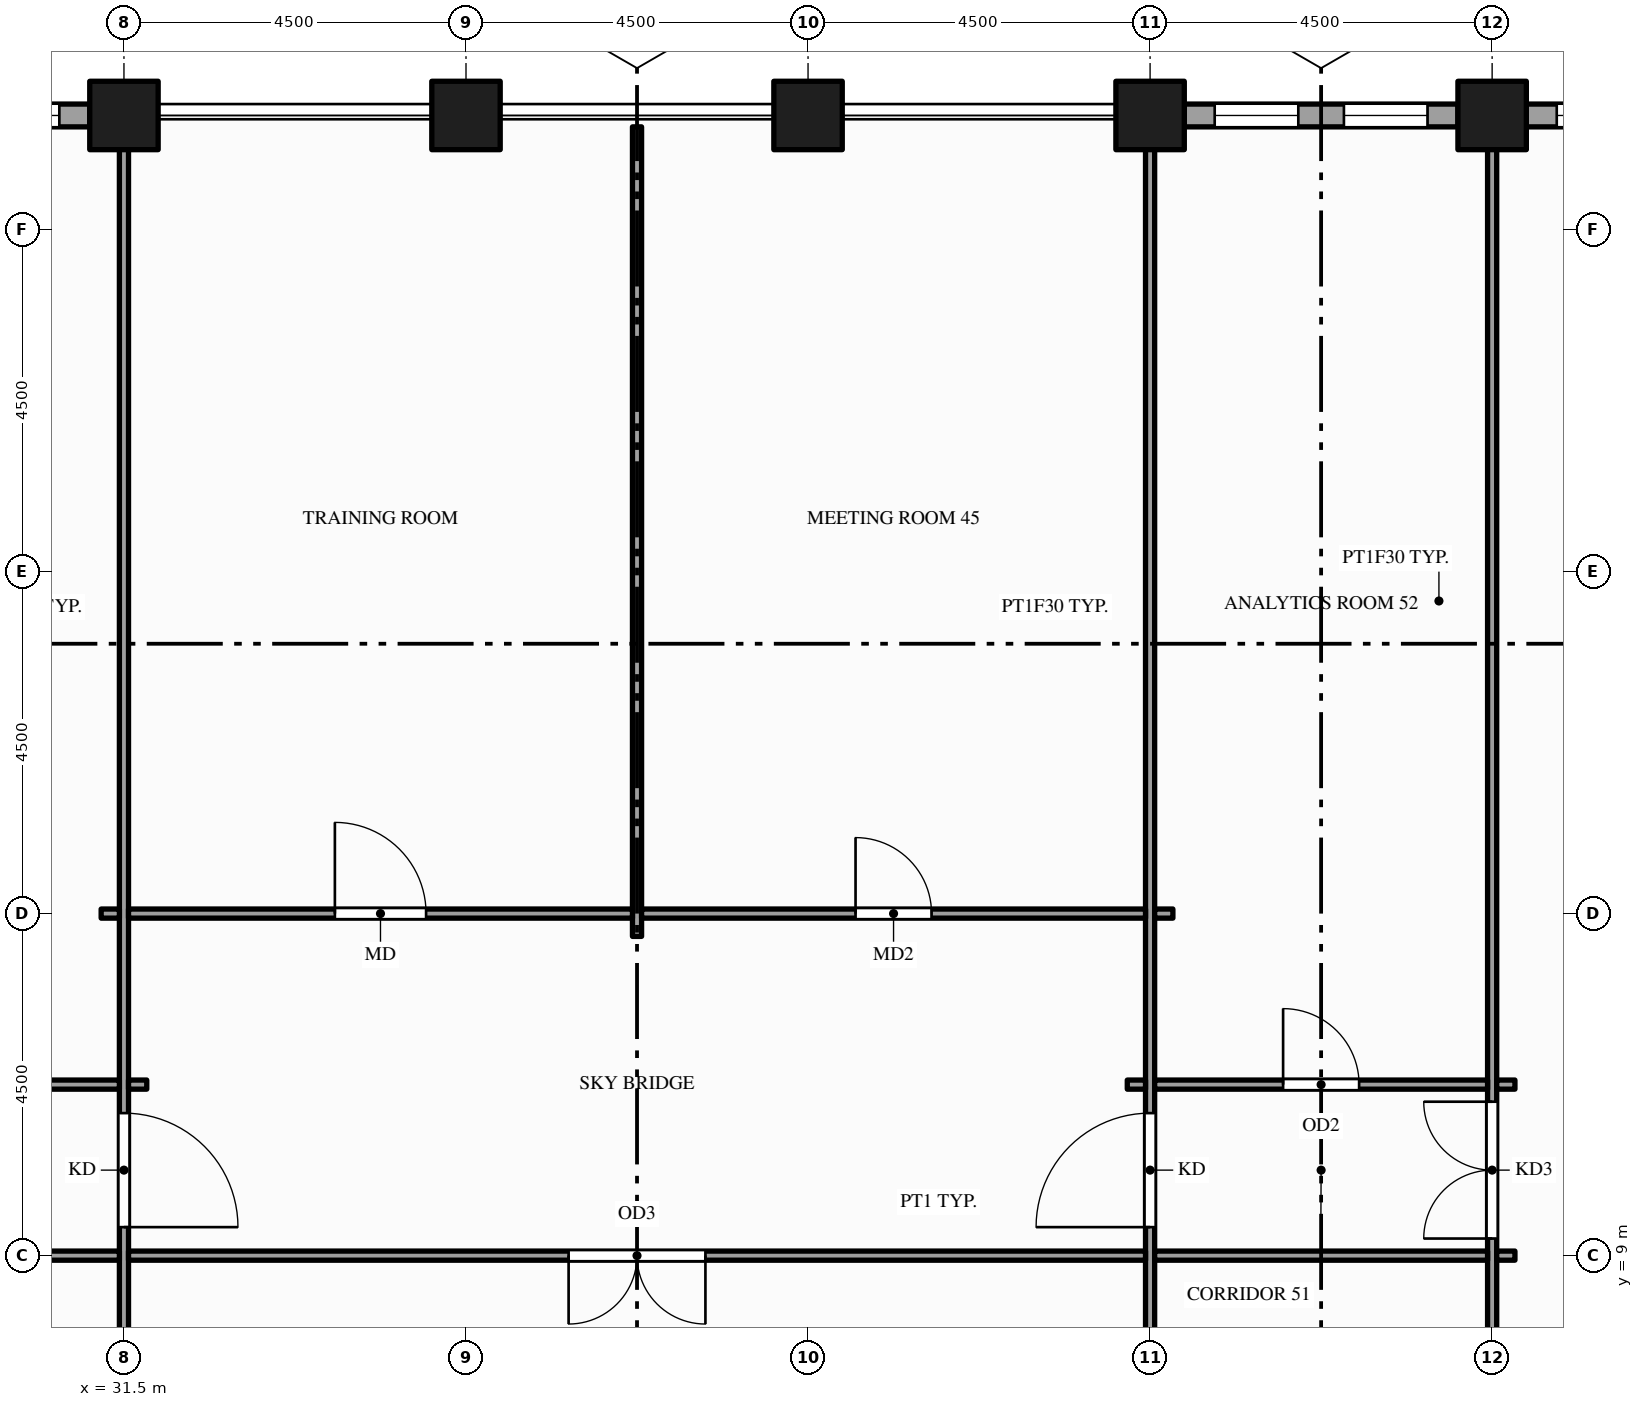
"""IFC4 building model, lengths in metres.
Left out: names, types, materials, properties, quantities, classifications, styles, units other than length and angle.
Written with IfcOpenShell. Run it as: python <this file> out.ifc"""

import sys

from ifc_helpers import new_model, si_unit, direction, frame, frame_2d, origin, origin_2d, place, context, subcontext, project, spatial, rectangle, hollow_rectangle, extrude, element, fill, save


model = new_model("IFC4")
c1 = context("Model", 3, precision=1e-05, world=origin(), true_north=direction((0.0, 1.0)))
c2 = subcontext(c1, "Body", "Model", "MODEL_VIEW")
j1 = project(units=[si_unit("LENGTHUNIT", "METRE"), si_unit("PLANEANGLEUNIT", "RADIAN")], contexts=[c1])
p1 = place(None, origin())
s1 = spatial("IfcSite", under=j1, at=p1, CompositionType="ELEMENT")
p2 = place(p1, origin())
s2 = spatial("IfcBuilding", under=s1, at=p2, CompositionType="ELEMENT")
p3 = place(p2, frame((0.0, 0.0, 151.0)))
s3 = spatial("IfcBuildingStorey", under=s2, at=p3, CompositionType="ELEMENT", Elevation=151.0)
for number, where, z_axis, x_axis in (
    (1, (31.5, 24.0, -0.15), (0.0, 0.0, 1.0), (1.0, 0.0, 0.0)),
    (2, (36.0, 24.0, -0.15), (0.0, 0.0, 1.0), (1.0, 0.0, 0.0)),
    (3, (40.5, 24.0, -0.15), (0.0, 0.0, 1.0), (1.0, 0.0, 0.0)),
    (4, (45.0, 24.0, -0.15), (0.0, 0.0, 1.0), (1.0, 0.0, 0.0)),
    (5, (49.5, 24.0, -0.15), (0.0, 0.0, 1.0), (1.0, 0.0, 0.0)),
):
    element("IfcColumn", number, at=place(p3, frame(where, z_axis=z_axis, x_axis=x_axis)), inside=s3, PredefinedType="COLUMN", context=c2, shape_type="SweptSolid", body=[
        extrude(hollow_rectangle(XDim=0.9, YDim=0.9, WallThickness=0.045, at=origin_2d()), origin(), (0.0, 0.0, 1.0), 4.0),
    ])
p4 = place(p3, frame((53.55, 24.0, 0.0), z_axis=(0.0, 0.0, 1.0), x_axis=(-1.0, 0.0, 0.0)))
e6 = element("IfcWall", 6, at=p4, inside=s3, PredefinedType="STANDARD", context=c2, shape_type="SweptSolid", body=[
    extrude(rectangle(XDim=3.6, YDim=0.3, at=frame_2d((1.8, 0.0))), origin(), (0.0, 0.0, 1.0), 2.87),
])
p5 = place(p4, frame((0.4, 0.0, 0.9)))
e7 = element("IfcOpeningElement", 7, at=p5, cuts=e6, PredefinedType="OPENING", context=c2, shape_type="SweptSolid", body=[
    extrude(rectangle(XDim=1.1, YDim=1.75, at=frame_2d((0.55, 0.875))), frame((0.0, 0.16, 0.0), z_axis=(0.0, -1.0, 0.0), x_axis=(1.0, 0.0, 0.0)), (0.0, 0.0, 1.0), 0.32),
])
p6 = place(p4, frame((2.1, 0.0, 0.9)))
e8 = element("IfcOpeningElement", 8, at=p6, cuts=e6, PredefinedType="OPENING", context=c2, shape_type="SweptSolid", body=[
    extrude(rectangle(XDim=1.1, YDim=1.75, at=frame_2d((0.55, 0.875))), frame((0.0, 0.16, 0.0), z_axis=(0.0, -1.0, 0.0), x_axis=(1.0, 0.0, 0.0)), (0.0, 0.0, 1.0), 0.32),
])
p7 = place(p3, frame((49.05, 24.0, 0.0), z_axis=(0.0, 0.0, 1.0), x_axis=(-1.0, 0.0, 0.0)))
e9 = element("IfcWall", 9, at=p7, inside=s3, PredefinedType="STANDARD", context=c2, shape_type="SweptSolid", body=[
    extrude(rectangle(XDim=3.6, YDim=0.3, at=frame_2d((1.8, 0.0))), origin(), (0.0, 0.0, 1.0), 2.87),
])
p8 = place(p7, frame((0.4, 0.0, 0.9)))
e10 = element("IfcOpeningElement", 10, at=p8, cuts=e9, PredefinedType="OPENING", context=c2, shape_type="SweptSolid", body=[
    extrude(rectangle(XDim=1.1, YDim=1.75, at=frame_2d((0.55, 0.875))), frame((0.0, 0.16, 0.0), z_axis=(0.0, -1.0, 0.0), x_axis=(1.0, 0.0, 0.0)), (0.0, 0.0, 1.0), 0.32),
])
p9 = place(p7, frame((2.1, 0.0, 0.9)))
e11 = element("IfcOpeningElement", 11, at=p9, cuts=e9, PredefinedType="OPENING", context=c2, shape_type="SweptSolid", body=[
    extrude(rectangle(XDim=1.1, YDim=1.75, at=frame_2d((0.55, 0.875))), frame((0.0, 0.16, 0.0), z_axis=(0.0, -1.0, 0.0), x_axis=(1.0, 0.0, 0.0)), (0.0, 0.0, 1.0), 0.32),
])
p10 = place(p3, frame((31.05, 24.0, 0.0), z_axis=(0.0, 0.0, 1.0), x_axis=(-1.0, 0.0, 0.0)))
e12 = element("IfcWall", 12, at=p10, inside=s3, PredefinedType="STANDARD", context=c2, shape_type="SweptSolid", body=[
    extrude(rectangle(XDim=5.1, YDim=0.3, at=frame_2d((2.55, 0.0))), origin(), (0.0, 0.0, 1.0), 2.87),
])
p11 = place(p10, frame((0.4, 0.0, 0.9)))
e13 = element("IfcOpeningElement", 13, at=p11, cuts=e12, PredefinedType="OPENING", context=c2, shape_type="SweptSolid", body=[
    extrude(rectangle(XDim=1.1, YDim=1.75, at=frame_2d((0.55, 0.875))), frame((0.0, 0.16, 0.0), z_axis=(0.0, -1.0, 0.0), x_axis=(1.0, 0.0, 0.0)), (0.0, 0.0, 1.0), 0.32),
])
p12 = place(p10, frame((2.1, 0.0, 0.9)))
e14 = element("IfcOpeningElement", 14, at=p12, cuts=e12, PredefinedType="OPENING", context=c2, shape_type="SweptSolid", body=[
    extrude(rectangle(XDim=1.65, YDim=1.75, at=frame_2d((0.825, 0.875))), frame((0.0, 0.16, 0.0), z_axis=(0.0, -1.0, 0.0), x_axis=(1.0, 0.0, 0.0)), (0.0, 0.0, 1.0), 0.32),
])
p13 = place(p3, frame((31.5, 1.65, 0.0), z_axis=(0.0, 0.0, 1.0), x_axis=(0.0, 1.0, 0.0)))
e15 = element("IfcWall", 15, at=p13, inside=s3, PredefinedType="PARTITIONING", context=c2, shape_type="SweptSolid", body=[
    extrude(rectangle(XDim=22.2, YDim=0.12, at=frame_2d((11.1, 0.0))), origin(), (0.0, 0.0, 1.0), 2.87),
])
p14 = place(p13, frame((7.725, 0.0, 0.0)))
e16 = element("IfcOpeningElement", 16, at=p14, cuts=e15, PredefinedType="OPENING", context=c2, shape_type="SweptSolid", body=[
    extrude(rectangle(XDim=1.5, YDim=2.1, at=frame_2d((0.75, 1.05))), frame((0.0, 0.07, 0.0), z_axis=(0.0, -1.0, 0.0), x_axis=(1.0, 0.0, 0.0)), (0.0, 0.0, 1.0), 0.14),
])
p15 = place(p3, frame((38.25, 13.2, 0.0), z_axis=(0.0, 0.0, 1.0), x_axis=(0.0, 1.0, 0.0)))
e17 = element("IfcWall", 17, at=p15, inside=s3, PredefinedType="PARTITIONING", context=c2, shape_type="SweptSolid", body=[
    extrude(rectangle(XDim=10.65, YDim=0.12, at=frame_2d((5.325, 0.0))), origin(), (0.0, 0.0, 1.0), 2.87),
])
p16 = place(p3, frame((45.0, 1.65, 0.0), z_axis=(0.0, 0.0, 1.0), x_axis=(0.0, 1.0, 0.0)))
e18 = element("IfcWall", 18, at=p16, inside=s3, PredefinedType="PARTITIONING", context=c2, shape_type="SweptSolid", body=[
    extrude(rectangle(XDim=22.2, YDim=0.12, at=frame_2d((11.1, 0.0))), origin(), (0.0, 0.0, 1.0), 2.87),
])
p17 = place(p16, frame((7.725, 0.0, 0.0)))
e19 = element("IfcOpeningElement", 19, at=p17, cuts=e18, PredefinedType="OPENING", context=c2, shape_type="SweptSolid", body=[
    extrude(rectangle(XDim=1.5, YDim=2.1, at=frame_2d((0.75, 1.05))), frame((0.0, 0.07, 0.0), z_axis=(0.0, -1.0, 0.0), x_axis=(1.0, 0.0, 0.0)), (0.0, 0.0, 1.0), 0.14),
])
p18 = place(p3, frame((49.5, 1.65, 0.0), z_axis=(0.0, 0.0, 1.0), x_axis=(0.0, 1.0, 0.0)))
e20 = element("IfcWall", 20, at=p18, inside=s3, PredefinedType="PARTITIONING", context=c2, shape_type="SweptSolid", body=[
    extrude(rectangle(XDim=22.2, YDim=0.12, at=frame_2d((11.1, 0.0))), origin(), (0.0, 0.0, 1.0), 2.87),
])
p19 = place(p18, frame((7.575, 0.0, 0.0)))
e21 = element("IfcOpeningElement", 21, at=p19, cuts=e20, PredefinedType="OPENING", context=c2, shape_type="SweptSolid", body=[
    extrude(rectangle(XDim=1.8, YDim=2.1, at=frame_2d((0.9, 1.05))), frame((0.0, 0.07, 0.0), z_axis=(0.0, -1.0, 0.0), x_axis=(1.0, 0.0, 0.0)), (0.0, 0.0, 1.0), 0.14),
])
p20 = place(p18, frame((0.85, 0.0, 0.0)))
e22 = element("IfcOpeningElement", 22, at=p20, cuts=e20, PredefinedType="OPENING", context=c2, shape_type="SweptSolid", body=[
    extrude(rectangle(XDim=0.9, YDim=2.1, at=frame_2d((0.45, 1.05))), frame((0.0, 0.07, 0.0), z_axis=(0.0, -1.0, 0.0), x_axis=(1.0, 0.0, 0.0)), (0.0, 0.0, 1.0), 0.14),
])
p21 = place(p18, frame((3.15, 0.0, 0.0)))
e23 = element("IfcOpeningElement", 23, at=p21, cuts=e20, PredefinedType="OPENING", context=c2, shape_type="SweptSolid", body=[
    extrude(rectangle(XDim=0.9, YDim=2.1, at=frame_2d((0.45, 1.05))), frame((0.0, 0.07, 0.0), z_axis=(0.0, -1.0, 0.0), x_axis=(1.0, 0.0, 0.0)), (0.0, 0.0, 1.0), 0.14),
])
p22 = place(p18, frame((5.35, 0.0, 0.0)))
e24 = element("IfcOpeningElement", 24, at=p22, cuts=e20, PredefinedType="OPENING", context=c2, shape_type="SweptSolid", body=[
    extrude(rectangle(XDim=1.0, YDim=2.1, at=frame_2d((0.5, 1.05))), frame((0.0, 0.07, 0.0), z_axis=(0.0, -1.0, 0.0), x_axis=(1.0, 0.0, 0.0)), (0.0, 0.0, 1.0), 0.14),
])
p23 = place(p3, frame((24.81, 9.0, 0.0), z_axis=(0.0, 0.0, 1.0), x_axis=(1.0, 0.0, 0.0)))
e25 = element("IfcWall", 25, at=p23, inside=s3, PredefinedType="PARTITIONING", context=c2, shape_type="SweptSolid", body=[
    extrude(rectangle(XDim=6.63, YDim=0.12, at=frame_2d((3.315, 0.0))), origin(), (0.0, 0.0, 1.0), 2.87),
])
p24 = place(p23, frame((2.815, 0.0, 0.0)))
e26 = element("IfcOpeningElement", 26, at=p24, cuts=e25, PredefinedType="OPENING", context=c2, shape_type="SweptSolid", body=[
    extrude(rectangle(XDim=1.0, YDim=2.1, at=frame_2d((0.5, 1.05))), frame((0.0, 0.07, 0.0), z_axis=(0.0, -1.0, 0.0), x_axis=(1.0, 0.0, 0.0)), (0.0, 0.0, 1.0), 0.14),
])
p25 = place(p3, frame((31.56, 9.0, 0.0), z_axis=(0.0, 0.0, 1.0), x_axis=(1.0, 0.0, 0.0)))
e27 = element("IfcWall", 27, at=p25, inside=s3, PredefinedType="PARTITIONING", context=c2, shape_type="SweptSolid", body=[
    extrude(rectangle(XDim=13.38, YDim=0.12, at=frame_2d((6.69, 0.0))), origin(), (0.0, 0.0, 1.0), 2.87),
])
p26 = place(p25, frame((5.79, 0.0, 0.0)))
e28 = element("IfcOpeningElement", 28, at=p26, cuts=e27, PredefinedType="OPENING", context=c2, shape_type="SweptSolid", body=[
    extrude(rectangle(XDim=1.8, YDim=2.1, at=frame_2d((0.9, 1.05))), frame((0.0, 0.07, 0.0), z_axis=(0.0, -1.0, 0.0), x_axis=(1.0, 0.0, 0.0)), (0.0, 0.0, 1.0), 0.14),
])
p27 = place(p3, frame((45.06, 9.0, 0.0), z_axis=(0.0, 0.0, 1.0), x_axis=(1.0, 0.0, 0.0)))
e29 = element("IfcWall", 29, at=p27, inside=s3, PredefinedType="PARTITIONING", context=c2, shape_type="SweptSolid", body=[
    extrude(rectangle(XDim=4.38, YDim=0.12, at=frame_2d((2.19, 0.0))), origin(), (0.0, 0.0, 1.0), 2.87),
])
p28 = place(p3, frame((49.56, 9.0, 0.0), z_axis=(0.0, 0.0, 1.0), x_axis=(1.0, 0.0, 0.0)))
e30 = element("IfcWall", 30, at=p28, inside=s3, PredefinedType="PARTITIONING", context=c2, shape_type="SweptSolid", body=[
    extrude(rectangle(XDim=0.24, YDim=0.12, at=frame_2d((0.12, 0.0))), origin(), (0.0, 0.0, 1.0), 2.87),
])
p29 = place(p3, frame((13.56, 11.25, 0.0), z_axis=(0.0, 0.0, 1.0), x_axis=(1.0, 0.0, 0.0)))
e31 = element("IfcWall", 31, at=p29, inside=s3, PredefinedType="PARTITIONING", context=c2, shape_type="SweptSolid", body=[
    extrude(rectangle(XDim=17.88, YDim=0.12, at=frame_2d((8.94, 0.0))), origin(), (0.0, 0.0, 1.0), 2.87),
])
p30 = place(p29, frame((8.04, 0.0, 0.0)))
e32 = element("IfcOpeningElement", 32, at=p30, cuts=e31, PredefinedType="OPENING", context=c2, shape_type="SweptSolid", body=[
    extrude(rectangle(XDim=1.8, YDim=2.1, at=frame_2d((0.9, 1.05))), frame((0.0, 0.07, 0.0), z_axis=(0.0, -1.0, 0.0), x_axis=(1.0, 0.0, 0.0)), (0.0, 0.0, 1.0), 0.14),
])
for number, where, z_axis, x_axis in (
    (33, (31.56, 11.25, 0.0), (0.0, 0.0, 1.0), (1.0, 0.0, 0.0)),
    (34, (44.7, 11.25, 0.0), (0.0, 0.0, 1.0), (1.0, 0.0, 0.0)),
):
    element("IfcWall", number, at=place(p3, frame(where, z_axis=z_axis, x_axis=x_axis)), inside=s3, PredefinedType="PARTITIONING", context=c2, shape_type="SweptSolid", body=[
        extrude(rectangle(XDim=0.24, YDim=0.12, at=frame_2d((0.12, 0.0))), origin(), (0.0, 0.0, 1.0), 2.87),
    ])
p31 = place(p3, frame((45.06, 11.25, 0.0), z_axis=(0.0, 0.0, 1.0), x_axis=(1.0, 0.0, 0.0)))
e35 = element("IfcWall", 35, at=p31, inside=s3, PredefinedType="PARTITIONING", context=c2, shape_type="SweptSolid", body=[
    extrude(rectangle(XDim=4.38, YDim=0.12, at=frame_2d((2.19, 0.0))), origin(), (0.0, 0.0, 1.0), 2.87),
])
p32 = place(p31, frame((1.69, 0.0, 0.0)))
e36 = element("IfcOpeningElement", 36, at=p32, cuts=e35, PredefinedType="OPENING", context=c2, shape_type="SweptSolid", body=[
    extrude(rectangle(XDim=1.0, YDim=2.1, at=frame_2d((0.5, 1.05))), frame((0.0, 0.07, 0.0), z_axis=(0.0, -1.0, 0.0), x_axis=(1.0, 0.0, 0.0)), (0.0, 0.0, 1.0), 0.14),
])
for number, where, z_axis, x_axis in (
    (37, (49.56, 11.25, 0.0), (0.0, 0.0, 1.0), (1.0, 0.0, 0.0)),
    (38, (31.2, 13.5, 0.0), (0.0, 0.0, 1.0), (1.0, 0.0, 0.0)),
):
    element("IfcWall", number, at=place(p3, frame(where, z_axis=z_axis, x_axis=x_axis)), inside=s3, PredefinedType="PARTITIONING", context=c2, shape_type="SweptSolid", body=[
        extrude(rectangle(XDim=0.24, YDim=0.12, at=frame_2d((0.12, 0.0))), origin(), (0.0, 0.0, 1.0), 2.87),
    ])
p33 = place(p3, frame((31.56, 13.5, 0.0), z_axis=(0.0, 0.0, 1.0), x_axis=(1.0, 0.0, 0.0)))
e39 = element("IfcWall", 39, at=p33, inside=s3, PredefinedType="PARTITIONING", context=c2, shape_type="SweptSolid", body=[
    extrude(rectangle(XDim=6.63, YDim=0.12, at=frame_2d((3.315, 0.0))), origin(), (0.0, 0.0, 1.0), 2.87),
])
p34 = place(p33, frame((2.715, 0.0, 0.0)))
e40 = element("IfcOpeningElement", 40, at=p34, cuts=e39, PredefinedType="OPENING", context=c2, shape_type="SweptSolid", body=[
    extrude(rectangle(XDim=1.2, YDim=2.1, at=frame_2d((0.6, 1.05))), frame((0.0, 0.07, 0.0), z_axis=(0.0, -1.0, 0.0), x_axis=(1.0, 0.0, 0.0)), (0.0, 0.0, 1.0), 0.14),
])
p35 = place(p3, frame((38.31, 13.5, 0.0), z_axis=(0.0, 0.0, 1.0), x_axis=(1.0, 0.0, 0.0)))
e41 = element("IfcWall", 41, at=p35, inside=s3, PredefinedType="PARTITIONING", context=c2, shape_type="SweptSolid", body=[
    extrude(rectangle(XDim=6.63, YDim=0.12, at=frame_2d((3.315, 0.0))), origin(), (0.0, 0.0, 1.0), 2.87),
])
p36 = place(p35, frame((2.815, 0.0, 0.0)))
e42 = element("IfcOpeningElement", 42, at=p36, cuts=e41, PredefinedType="OPENING", context=c2, shape_type="SweptSolid", body=[
    extrude(rectangle(XDim=1.0, YDim=2.1, at=frame_2d((0.5, 1.05))), frame((0.0, 0.07, 0.0), z_axis=(0.0, -1.0, 0.0), x_axis=(1.0, 0.0, 0.0)), (0.0, 0.0, 1.0), 0.14),
])
p37 = place(p3, frame((45.06, 13.5, 0.0), z_axis=(0.0, 0.0, 1.0), x_axis=(1.0, 0.0, 0.0)))
e43 = element("IfcWall", 43, at=p37, inside=s3, PredefinedType="PARTITIONING", context=c2, shape_type="SweptSolid", body=[
    extrude(rectangle(XDim=0.24, YDim=0.12, at=frame_2d((0.12, 0.0))), origin(), (0.0, 0.0, 1.0), 2.87),
])
p38 = place(p6, origin())
e44 = element("IfcWindow", 44, at=p38, inside=s3, PartitioningType="SINGLE_PANEL", PredefinedType="WINDOW", context=c2, shape_type="SweptSolid", body=[
    extrude(rectangle(XDim=1.1, YDim=1.75, at=frame_2d((0.55, 0.875))), frame((0.0, 0.03, 0.0), z_axis=(0.0, -1.0, 0.0), x_axis=(1.0, 0.0, 0.0)), (0.0, 0.0, 1.0), 0.06),
])
fill(e8, e44)
p39 = place(p8, origin())
e45 = element("IfcWindow", 45, at=p39, inside=s3, PartitioningType="SINGLE_PANEL", PredefinedType="WINDOW", context=c2, shape_type="SweptSolid", body=[
    extrude(rectangle(XDim=1.1, YDim=1.75, at=frame_2d((0.55, 0.875))), frame((0.0, 0.03, 0.0), z_axis=(0.0, -1.0, 0.0), x_axis=(1.0, 0.0, 0.0)), (0.0, 0.0, 1.0), 0.06),
])
fill(e10, e45)
p40 = place(p9, origin())
e46 = element("IfcWindow", 46, at=p40, inside=s3, PartitioningType="SINGLE_PANEL", PredefinedType="WINDOW", context=c2, shape_type="SweptSolid", body=[
    extrude(rectangle(XDim=1.1, YDim=1.75, at=frame_2d((0.55, 0.875))), frame((0.0, 0.03, 0.0), z_axis=(0.0, -1.0, 0.0), x_axis=(1.0, 0.0, 0.0)), (0.0, 0.0, 1.0), 0.06),
])
fill(e11, e46)
p41 = place(p11, origin())
e47 = element("IfcWindow", 47, at=p41, inside=s3, PartitioningType="SINGLE_PANEL", PredefinedType="WINDOW", context=c2, shape_type="SweptSolid", body=[
    extrude(rectangle(XDim=1.1, YDim=1.75, at=frame_2d((0.55, 0.875))), frame((0.0, 0.03, 0.0), z_axis=(0.0, -1.0, 0.0), x_axis=(1.0, 0.0, 0.0)), (0.0, 0.0, 1.0), 0.06),
])
fill(e13, e47)
p42 = place(p14, origin())
e48 = element("IfcDoor", 48, at=p42, inside=s3, OperationType="SINGLE_SWING_LEFT", PredefinedType="DOOR", context=c2, shape_type="SweptSolid", body=[
    extrude(rectangle(XDim=1.5, YDim=2.1, at=frame_2d((0.75, 1.05))), frame((0.0, 0.025, 0.0), z_axis=(0.0, -1.0, 0.0), x_axis=(1.0, 0.0, 0.0)), (0.0, 0.0, 1.0), 0.05),
])
fill(e16, e48)
p43 = place(p17, origin())
e49 = element("IfcDoor", 49, at=p43, inside=s3, OperationType="SINGLE_SWING_LEFT", PredefinedType="DOOR", context=c2, shape_type="SweptSolid", body=[
    extrude(rectangle(XDim=1.5, YDim=2.1, at=frame_2d((0.75, 1.05))), frame((0.0, 0.025, 0.0), z_axis=(0.0, -1.0, 0.0), x_axis=(1.0, 0.0, 0.0)), (0.0, 0.0, 1.0), 0.05),
])
fill(e19, e49)
p44 = place(p19, origin())
e50 = element("IfcDoor", 50, at=p44, inside=s3, OperationType="DOUBLE_DOOR_SINGLE_SWING", PredefinedType="DOOR", context=c2, shape_type="SweptSolid", body=[
    extrude(rectangle(XDim=1.8, YDim=2.1, at=frame_2d((0.9, 1.05))), frame((0.0, 0.025, 0.0), z_axis=(0.0, -1.0, 0.0), x_axis=(1.0, 0.0, 0.0)), (0.0, 0.0, 1.0), 0.05),
])
fill(e21, e50)
p45 = place(p26, origin())
e51 = element("IfcDoor", 51, at=p45, inside=s3, OperationType="DOUBLE_DOOR_SINGLE_SWING", PredefinedType="DOOR", context=c2, shape_type="SweptSolid", body=[
    extrude(rectangle(XDim=1.8, YDim=2.1, at=frame_2d((0.9, 1.05))), frame((0.0, 0.025, 0.0), z_axis=(0.0, -1.0, 0.0), x_axis=(1.0, 0.0, 0.0)), (0.0, 0.0, 1.0), 0.05),
])
fill(e28, e51)
p46 = place(p34, origin())
e52 = element("IfcDoor", 52, at=p46, inside=s3, OperationType="SINGLE_SWING_LEFT", PredefinedType="DOOR", context=c2, shape_type="SweptSolid", body=[
    extrude(rectangle(XDim=1.2, YDim=2.1, at=frame_2d((0.6, 1.05))), frame((0.0, 0.025, 0.0), z_axis=(0.0, -1.0, 0.0), x_axis=(1.0, 0.0, 0.0)), (0.0, 0.0, 1.0), 0.05),
])
fill(e40, e52)
p47 = place(p36, origin())
e53 = element("IfcDoor", 53, at=p47, inside=s3, OperationType="SINGLE_SWING_LEFT", PredefinedType="DOOR", context=c2, shape_type="SweptSolid", body=[
    extrude(rectangle(XDim=1.0, YDim=2.1, at=frame_2d((0.5, 1.05))), frame((0.0, 0.025, 0.0), z_axis=(0.0, -1.0, 0.0), x_axis=(1.0, 0.0, 0.0)), (0.0, 0.0, 1.0), 0.05),
])
fill(e42, e53)
p48 = place(p32, origin())
e54 = element("IfcDoor", 54, at=p48, inside=s3, OperationType="SINGLE_SWING_LEFT", PredefinedType="DOOR", context=c2, shape_type="SweptSolid", body=[
    extrude(rectangle(XDim=1.0, YDim=2.1, at=frame_2d((0.5, 1.05))), frame((0.0, 0.025, 0.0), z_axis=(0.0, -1.0, 0.0), x_axis=(1.0, 0.0, 0.0)), (0.0, 0.0, 1.0), 0.05),
])
fill(e36, e54)
save(model, sys.argv[1])
